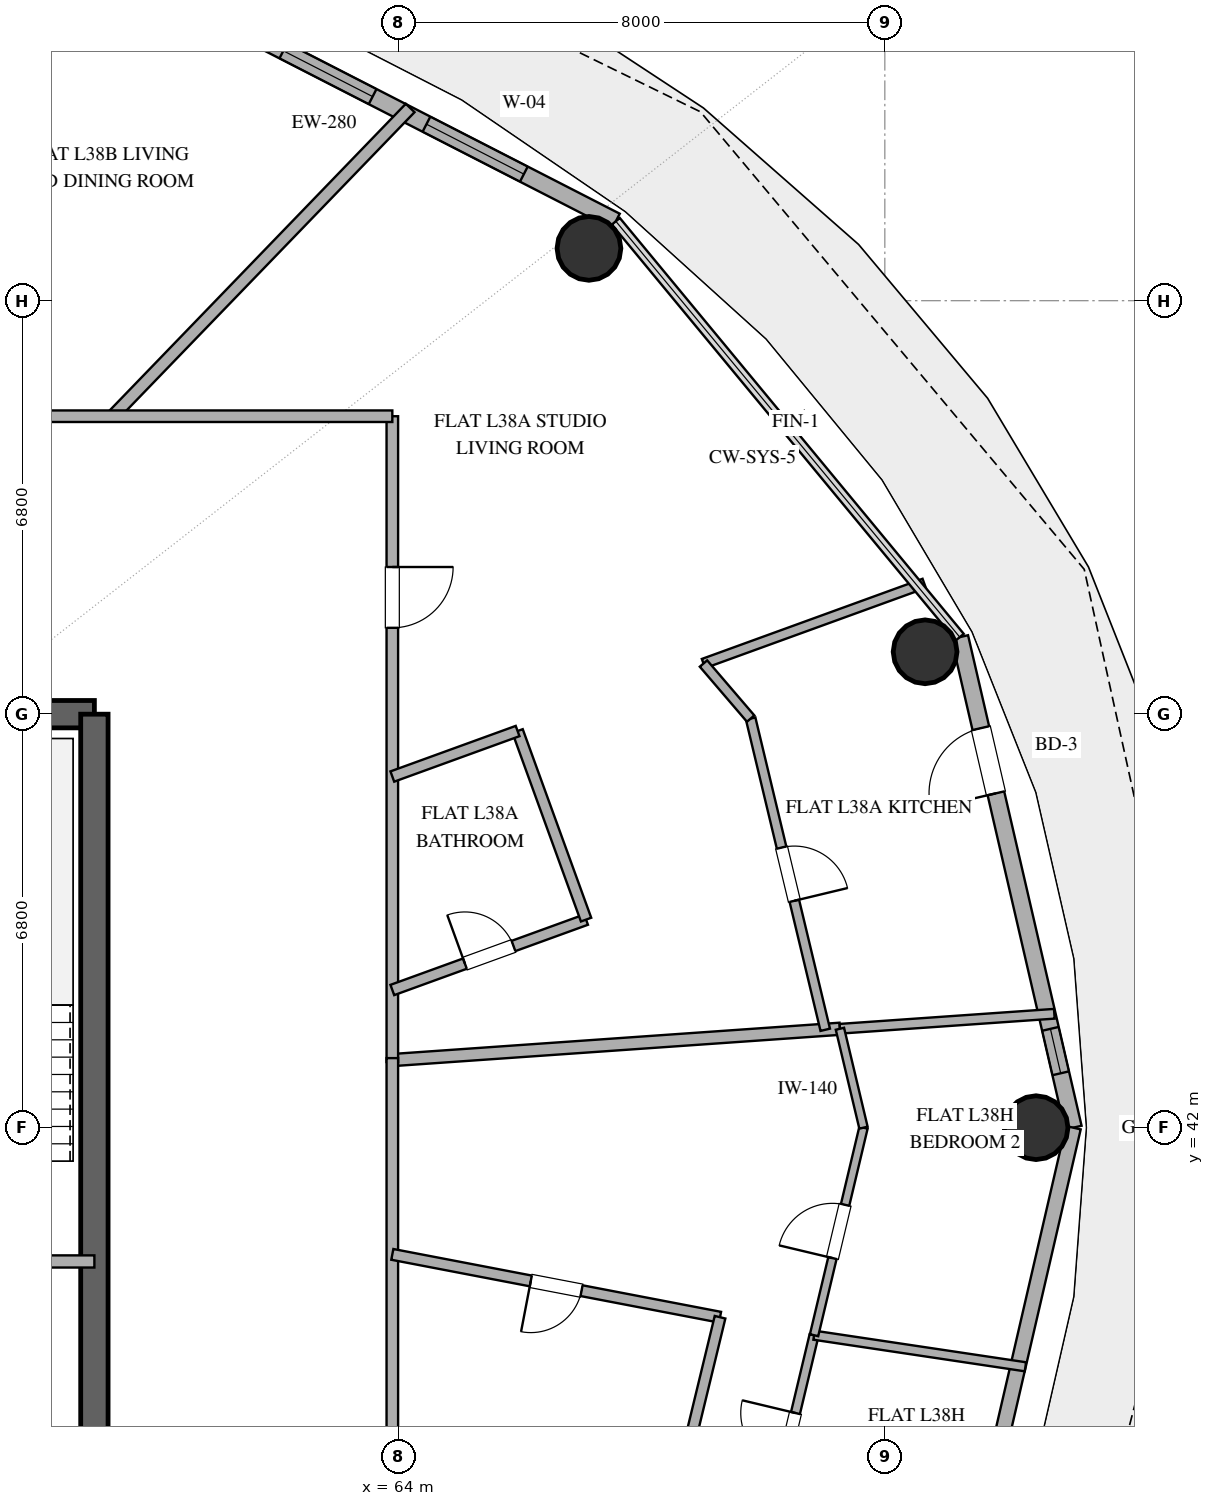
"""IFC4 building model, lengths in metres.
Left out: names, types, materials, properties, quantities, classifications, styles, units other than length and angle.
Written with IfcOpenShell. Run it as: python <this file> out.ifc"""

import sys

from ifc_helpers import new_model, si_unit, direction, frame, frame_2d, origin, origin_2d, place, context, subcontext, project, spatial, rectangle, hollow_circle, extrude, element, fill, save


model = new_model("IFC4")
c1 = context("Model", 3, precision=1e-05, world=origin(), true_north=direction((0.0, 1.0)))
c2 = subcontext(c1, "Body", "Model", "MODEL_VIEW")
j1 = project(units=[si_unit("LENGTHUNIT", "METRE"), si_unit("PLANEANGLEUNIT", "RADIAN")], contexts=[c1])
p1 = place(None, origin())
s1 = spatial("IfcSite", under=j1, at=p1, CompositionType="ELEMENT")
p2 = place(p1, origin())
s2 = spatial("IfcBuilding", under=s1, at=p2, CompositionType="ELEMENT")
p3 = place(p2, frame((0.0, 0.0, 154.2)))
s3 = spatial("IfcBuildingStorey", under=s2, at=p3, CompositionType="ELEMENT", Elevation=154.2)
p4 = place(p3, frame((55.0, 48.8, 0.0), z_axis=(0.0, 0.0, 1.0), x_axis=(1.0, 0.0, 0.0)))
e1 = element("IfcWall", 1, at=p4, inside=s3, PredefinedType="SHEAR", context=c2, shape_type="SweptSolid", body=[
    extrude(rectangle(XDim=4.0, YDim=0.45, at=frame_2d((2.0, 0.0))), origin(), (0.0, 0.0, 1.0), 3.38),
])
p5 = place(p3, frame((59.0, 35.2, 0.0), z_axis=(0.0, 0.0, 1.0), x_axis=(0.0, 1.0, 0.0)))
e2 = element("IfcWall", 2, at=p5, inside=s3, PredefinedType="SHEAR", context=c2, shape_type="SweptSolid", body=[
    extrude(rectangle(XDim=13.6, YDim=0.45, at=frame_2d((6.8, 0.0))), origin(), (0.0, 0.0, 1.0), 3.38),
])
for number, where, z_axis, x_axis in (
    (3, (74.487, 42.0, 0.0), (0.0, 0.0, 1.0), (1.0, 0.0, 0.0)),
    (4, (72.662, 49.826, 0.0), (0.0, 0.0, 1.0), (1.0, 0.0, 0.0)),
    (5, (67.134, 56.46, 0.0), (0.0, 0.0, 1.0), (1.0, 0.0, 0.0)),
):
    element("IfcColumn", number, at=place(p3, frame(where, z_axis=z_axis, x_axis=x_axis)), inside=s3, PredefinedType="COLUMN", context=c2, shape_type="SweptSolid", body=[
        extrude(hollow_circle(Radius=0.525, WallThickness=0.028, at=origin_2d()), origin(), (0.0, 0.0, 1.0), 3.38),
    ])
p6 = place(p3, frame((75.099, 42.0, 0.0), z_axis=(0.0, 0.0, 1.0), x_axis=(-0.225473184558, 0.974249374157, 0.0)))
e6 = element("IfcWall", 6, at=p6, inside=s3, PredefinedType="SOLIDWALL", context=c2, shape_type="SweptSolid", body=[
    extrude(rectangle(XDim=8.28, YDim=0.28, at=frame_2d((4.14, 0.0))), origin(), (0.0, 0.0, 1.0), 3.38),
])
p7 = place(p6, frame((5.644, 0.0, 0.0)))
e7 = element("IfcOpeningElement", 7, at=p7, cuts=e6, PredefinedType="OPENING", context=c2, shape_type="SweptSolid", body=[
    extrude(rectangle(XDim=1.1, YDim=2.25, at=frame_2d((0.55, 1.125))), frame((0.0, 0.15, 0.0), z_axis=(0.0, -1.0, 0.0), x_axis=(1.0, 0.0, 0.0)), (0.0, 0.0, 1.0), 0.3),
])
p8 = place(p6, frame((0.918, 0.0, 0.85)))
e8 = element("IfcOpeningElement", 8, at=p8, cuts=e6, PredefinedType="OPENING", context=c2, shape_type="SweptSolid", body=[
    extrude(rectangle(XDim=0.75, YDim=1.8, at=frame_2d((0.375, 0.9))), frame((0.0, 0.15, 0.0), z_axis=(0.0, -1.0, 0.0), x_axis=(1.0, 0.0, 0.0)), (0.0, 0.0, 1.0), 0.3),
])
p9 = place(p3, frame((67.576, 56.906, 0.0), z_axis=(0.0, 0.0, 1.0), x_axis=(-0.889872523182, 0.456209263919, 0.0)))
e9 = element("IfcWall", 9, at=p9, inside=s3, PredefinedType="SOLIDWALL", context=c2, shape_type="SweptSolid", body=[
    extrude(rectangle(XDim=10.016, YDim=0.28, at=frame_2d((5.008, 0.0))), origin(), (0.0, 0.0, 1.0), 3.38),
])
p10 = place(p9, frame((1.7, 0.0, 0.85)))
e10 = element("IfcOpeningElement", 10, at=p10, cuts=e9, PredefinedType="OPENING", context=c2, shape_type="SweptSolid", body=[
    extrude(rectangle(XDim=1.8, YDim=2.2, at=frame_2d((0.9, 1.1))), frame((0.0, 0.15, 0.0), z_axis=(0.0, -1.0, 0.0), x_axis=(1.0, 0.0, 0.0)), (0.0, 0.0, 1.0), 0.3),
])
p11 = place(p9, frame((4.495, 0.0, 0.85)))
e11 = element("IfcOpeningElement", 11, at=p11, cuts=e9, PredefinedType="OPENING", context=c2, shape_type="SweptSolid", body=[
    extrude(rectangle(XDim=1.65, YDim=2.0, at=frame_2d((0.825, 1.0))), frame((0.0, 0.15, 0.0), z_axis=(0.0, -1.0, 0.0), x_axis=(1.0, 0.0, 0.0)), (0.0, 0.0, 1.0), 0.3),
])
p12 = place(p9, frame((6.53, 0.0, 0.85)))
e12 = element("IfcOpeningElement", 12, at=p12, cuts=e9, PredefinedType="OPENING", context=c2, shape_type="SweptSolid", body=[
    extrude(rectangle(XDim=1.65, YDim=2.0, at=frame_2d((0.825, 1.0))), frame((0.0, 0.15, 0.0), z_axis=(0.0, -1.0, 0.0), x_axis=(1.0, 0.0, 0.0)), (0.0, 0.0, 1.0), 0.3),
])
p13 = place(p3, frame((73.232, 33.933, 0.0), z_axis=(0.0, 0.0, 1.0), x_axis=(0.225473184558, 0.974249374157, 0.0)))
e13 = element("IfcWall", 13, at=p13, inside=s3, PredefinedType="SOLIDWALL", context=c2, shape_type="SweptSolid", body=[
    extrude(rectangle(XDim=8.28, YDim=0.25, at=frame_2d((4.14, 0.0))), origin(), (0.0, 0.0, 1.0), 3.38),
])
p14 = place(p13, frame((0.886, 0.0, 1.42)))
e14 = element("IfcOpeningElement", 14, at=p14, cuts=e13, PredefinedType="OPENING", context=c2, shape_type="SweptSolid", body=[
    extrude(rectangle(XDim=1.0, YDim=1.05, at=frame_2d((0.5, 0.525))), frame((0.0, 0.135, 0.0), z_axis=(0.0, -1.0, 0.0), x_axis=(1.0, 0.0, 0.0)), (0.0, 0.0, 1.0), 0.27),
])
p15 = place(p3, frame((55.0, 39.8, 0.0), z_axis=(0.0, 0.0, 1.0), x_axis=(1.0, 0.0, 0.0)))
e15 = element("IfcWall", 15, at=p15, inside=s3, PredefinedType="SOLIDWALL", context=c2, shape_type="SweptSolid", body=[
    extrude(rectangle(XDim=4.0, YDim=0.2, at=frame_2d((2.0, 0.0))), origin(), (0.0, 0.0, 1.0), 2.74),
])
p16 = place(p15, frame((1.45, 0.0, 0.0)))
e16 = element("IfcOpeningElement", 16, at=p16, cuts=e15, PredefinedType="OPENING", context=c2, shape_type="SweptSolid", body=[
    extrude(rectangle(XDim=1.1, YDim=2.15, at=frame_2d((0.55, 1.075))), frame((0.0, 0.11, 0.0), z_axis=(0.0, -1.0, 0.0), x_axis=(1.0, 0.0, 0.0)), (0.0, 0.0, 1.0), 0.22),
])
p17 = place(p3, frame((71.261, 43.627, 0.0), z_axis=(0.0, 0.0, 1.0), x_axis=(-0.997562906323, -0.069772830877, 0.0)))
e17 = element("IfcWall", 17, at=p17, inside=s3, PredefinedType="PARTITIONING", context=c2, shape_type="SweptSolid", body=[
    extrude(rectangle(XDim=7.38, YDim=0.2, at=frame_2d((3.69, 0.0))), origin(), (0.0, 0.0, 1.0), 2.74),
])
p18 = place(p3, frame((64.194, 58.769, 0.0), z_axis=(0.0, 0.0, 1.0), x_axis=(-0.694647685064, -0.719350118952, 0.0)))
e18 = element("IfcWall", 18, at=p18, inside=s3, PredefinedType="PARTITIONING", context=c2, shape_type="SweptSolid", body=[
    extrude(rectangle(XDim=7.047, YDim=0.2, at=frame_2d((3.523, 0.0))), origin(), (0.0, 0.0, 1.0), 2.74),
])
p19 = place(p3, frame((63.9, 53.7, 0.0), z_axis=(0.0, 0.0, 1.0), x_axis=(0.0, -1.0, 0.0)))
e19 = element("IfcWall", 19, at=p19, inside=s3, PredefinedType="PARTITIONING", context=c2, shape_type="SweptSolid", body=[
    extrude(rectangle(XDim=10.62, YDim=0.19, at=frame_2d((5.31, 0.0))), origin(), (0.0, 0.0, 1.0), 2.74),
])
p20 = place(p19, frame((2.48, 0.0, 0.0)))
e20 = element("IfcOpeningElement", 20, at=p20, cuts=e19, PredefinedType="OPENING", context=c2, shape_type="SweptSolid", body=[
    extrude(rectangle(XDim=1.0, YDim=2.2, at=frame_2d((0.5, 1.1))), frame((0.0, 0.105, 0.0), z_axis=(0.0, -1.0, 0.0), x_axis=(1.0, 0.0, 0.0)), (0.0, 0.0, 1.0), 0.21),
])
p21 = place(p3, frame((49.612, 53.7, 0.0), z_axis=(0.0, 0.0, 1.0), x_axis=(1.0, 0.0, 0.0)))
e21 = element("IfcWall", 21, at=p21, inside=s3, PredefinedType="PARTITIONING", context=c2, shape_type="SweptSolid", body=[
    extrude(rectangle(XDim=14.288, YDim=0.19, at=frame_2d((7.144, 0.0))), origin(), (0.0, 0.0, 1.0), 2.74),
])
p22 = place(p21, frame((6.395, 0.0, 0.0)))
e22 = element("IfcOpeningElement", 22, at=p22, cuts=e21, PredefinedType="OPENING", context=c2, shape_type="SweptSolid", body=[
    extrude(rectangle(XDim=1.0, YDim=2.2, at=frame_2d((0.5, 1.1))), frame((0.0, 0.105, 0.0), z_axis=(0.0, -1.0, 0.0), x_axis=(1.0, 0.0, 0.0)), (0.0, 0.0, 1.0), 0.21),
])
p23 = place(p3, frame((63.9, 43.144, 0.0), z_axis=(0.0, 0.0, 1.0), x_axis=(0.0, -1.0, 0.0)))
e23 = element("IfcWall", 23, at=p23, inside=s3, PredefinedType="PARTITIONING", context=c2, shape_type="SweptSolid", body=[
    extrude(rectangle(XDim=12.844, YDim=0.19, at=frame_2d((6.422, 0.0))), origin(), (0.0, 0.0, 1.0), 2.74),
])
p24 = place(p23, frame((9.529, 0.0, 0.0)))
e24 = element("IfcOpeningElement", 24, at=p24, cuts=e23, PredefinedType="OPENING", context=c2, shape_type="SweptSolid", body=[
    extrude(rectangle(XDim=1.0, YDim=2.2, at=frame_2d((0.5, 1.1))), frame((0.0, 0.105, 0.0), z_axis=(0.0, -1.0, 0.0), x_axis=(1.0, 0.0, 0.0)), (0.0, 0.0, 1.0), 0.21),
])
p25 = place(p3, frame((69.29, 38.883, 0.0), z_axis=(0.0, 0.0, 1.0), x_axis=(-0.98210182834, 0.188350733396, 0.0)))
e25 = element("IfcWall", 25, at=p25, inside=s3, PredefinedType="PLUMBINGWALL", context=c2, shape_type="SweptSolid", body=[
    extrude(rectangle(XDim=5.488, YDim=0.18, at=frame_2d((2.744, 0.0))), origin(), (0.0, 0.0, 1.0), 2.74),
])
p26 = place(p25, frame((2.319, 0.0, 0.0)))
e26 = element("IfcOpeningElement", 26, at=p26, cuts=e25, PredefinedType="OPENING", context=c2, shape_type="SweptSolid", body=[
    extrude(rectangle(XDim=0.85, YDim=2.1, at=frame_2d((0.425, 1.05))), frame((0.0, 0.1, 0.0), z_axis=(0.0, -1.0, 0.0), x_axis=(1.0, 0.0, 0.0)), (0.0, 0.0, 1.0), 0.2),
])
p27 = place(p3, frame((69.793, 48.728, 0.0), z_axis=(0.0, 0.0, 1.0), x_axis=(0.23310450522, -0.972451690135, 0.0)))
e27 = element("IfcWall", 27, at=p27, inside=s3, PredefinedType="PLUMBINGWALL", context=c2, shape_type="SweptSolid", body=[
    extrude(rectangle(XDim=5.263, YDim=0.16, at=frame_2d((2.631, 0.0))), origin(), (0.0, 0.0, 1.0), 2.74),
])
p28 = place(p27, frame((2.181, 0.0, 0.0)))
e28 = element("IfcOpeningElement", 28, at=p28, cuts=e27, PredefinedType="OPENING", context=c2, shape_type="SweptSolid", body=[
    extrude(rectangle(XDim=0.9, YDim=2.1, at=frame_2d((0.45, 1.05))), frame((0.0, 0.09, 0.0), z_axis=(0.0, -1.0, 0.0), x_axis=(1.0, 0.0, 0.0)), (0.0, 0.0, 1.0), 0.18),
])
p29 = place(p3, frame((72.647, 50.951, 0.0), z_axis=(0.0, 0.0, 1.0), x_axis=(-0.939926248806, -0.341377572206, 0.0)))
e29 = element("IfcWall", 29, at=p29, inside=s3, PredefinedType="PLUMBINGWALL", context=c2, shape_type="SweptSolid", body=[
    extrude(rectangle(XDim=3.862, YDim=0.16, at=frame_2d((1.931, 0.0))), origin(), (0.0, 0.0, 1.0), 2.74),
])
p30 = place(p3, frame((71.261, 43.627, 0.0), z_axis=(0.0, 0.0, 1.0), x_axis=(0.997563824095, 0.069759707979, 0.0)))
e30 = element("IfcWall", 30, at=p30, inside=s3, PredefinedType="PLUMBINGWALL", context=c2, shape_type="SweptSolid", body=[
    extrude(rectangle(XDim=3.535, YDim=0.16, at=frame_2d((1.767, 0.0))), origin(), (0.0, 0.0, 1.0), 2.74),
])
p31 = place(p3, frame((70.015, 35.153, 0.0), z_axis=(0.0, 0.0, 1.0), x_axis=(0.232452361323, 0.972607783084, 0.0)))
e31 = element("IfcWall", 31, at=p31, inside=s3, PredefinedType="PARTITIONING", context=c2, shape_type="SweptSolid", body=[
    extrude(rectangle(XDim=3.531, YDim=0.15, at=frame_2d((1.766, 0.0))), origin(), (0.0, 0.0, 1.0), 2.74),
])
p32 = place(p31, frame((1.315, 0.0, 0.0)))
e32 = element("IfcOpeningElement", 32, at=p32, cuts=e31, PredefinedType="OPENING", context=c2, shape_type="SweptSolid", body=[
    extrude(rectangle(XDim=0.9, YDim=2.1, at=frame_2d((0.45, 1.05))), frame((0.0, 0.085, 0.0), z_axis=(0.0, -1.0, 0.0), x_axis=(1.0, 0.0, 0.0)), (0.0, 0.0, 1.0), 0.17),
])
p33 = place(p3, frame((74.312, 38.068, 0.0), z_axis=(0.0, 0.0, 1.0), x_axis=(-0.989013160958, 0.147827492205, 0.0)))
e33 = element("IfcWall", 33, at=p33, inside=s3, PredefinedType="PARTITIONING", context=c2, shape_type="SweptSolid", body=[
    extrude(rectangle(XDim=3.514, YDim=0.15, at=frame_2d((1.757, 0.0))), origin(), (0.0, 0.0, 1.0), 2.74),
])
p34 = place(p3, frame((70.836, 38.587, 0.0), z_axis=(0.0, 0.0, 1.0), x_axis=(0.231598574747, 0.972811441223, 0.0)))
e34 = element("IfcWall", 34, at=p34, inside=s3, PredefinedType="PARTITIONING", context=c2, shape_type="SweptSolid", body=[
    extrude(rectangle(XDim=3.508, YDim=0.14, at=frame_2d((1.754, 0.0))), origin(), (0.0, 0.0, 1.0), 2.74),
])
p35 = place(p34, frame((1.304, 0.0, 0.0)))
e35 = element("IfcOpeningElement", 35, at=p35, cuts=e34, PredefinedType="OPENING", context=c2, shape_type="SweptSolid", body=[
    extrude(rectangle(XDim=0.9, YDim=2.1, at=frame_2d((0.45, 1.05))), frame((0.0, 0.08, 0.0), z_axis=(0.0, -1.0, 0.0), x_axis=(1.0, 0.0, 0.0)), (0.0, 0.0, 1.0), 0.16),
])
p36 = place(p3, frame((63.9, 44.264, 0.0), z_axis=(0.0, 0.0, 1.0), x_axis=(0.939936319397, 0.341349843238, 0.0)))
e36 = element("IfcWall", 36, at=p36, inside=s3, PredefinedType="PLUMBINGWALL", context=c2, shape_type="SweptSolid", body=[
    extrude(rectangle(XDim=3.39, YDim=0.18, at=frame_2d((1.695, 0.0))), origin(), (0.0, 0.0, 1.0), 2.74),
])
p37 = place(p36, frame((1.27, 0.0, 0.0)))
e37 = element("IfcOpeningElement", 37, at=p37, cuts=e36, PredefinedType="OPENING", context=c2, shape_type="SweptSolid", body=[
    extrude(rectangle(XDim=0.85, YDim=2.1, at=frame_2d((0.425, 1.05))), frame((0.0, 0.1, 0.0), z_axis=(0.0, -1.0, 0.0), x_axis=(1.0, 0.0, 0.0)), (0.0, 0.0, 1.0), 0.2),
])
p38 = place(p3, frame((67.086, 45.421, 0.0), z_axis=(0.0, 0.0, 1.0), x_axis=(-0.341333094487, 0.93994240175, 0.0)))
e38 = element("IfcWall", 38, at=p38, inside=s3, PredefinedType="PLUMBINGWALL", context=c2, shape_type="SweptSolid", body=[
    extrude(rectangle(XDim=3.3, YDim=0.18, at=frame_2d((1.65, 0.0))), origin(), (0.0, 0.0, 1.0), 2.74),
])
p39 = place(p3, frame((68.526, 35.732, 0.0), z_axis=(0.0, 0.0, 1.0), x_axis=(0.235531062042, 0.971866821541, 0.0)))
e39 = element("IfcWall", 39, at=p39, inside=s3, PredefinedType="PLUMBINGWALL", context=c2, shape_type="SweptSolid", body=[
    extrude(rectangle(XDim=3.242, YDim=0.18, at=frame_2d((1.621, 0.0))), origin(), (0.0, 0.0, 1.0), 2.74),
])
p40 = place(p3, frame((65.96, 48.523, 0.0), z_axis=(0.0, 0.0, 1.0), x_axis=(-0.939962415694, -0.341277976263, 0.0)))
e40 = element("IfcWall", 40, at=p40, inside=s3, PredefinedType="PLUMBINGWALL", context=c2, shape_type="SweptSolid", body=[
    extrude(rectangle(XDim=2.192, YDim=0.18, at=frame_2d((1.096, 0.0))), origin(), (0.0, 0.0, 1.0), 2.74),
])
p41 = place(p3, frame((71.649, 42.0, 0.0), z_axis=(0.0, 0.0, 1.0), x_axis=(-0.231561310927, 0.972820311919, 0.0)))
e41 = element("IfcWall", 41, at=p41, inside=s3, PredefinedType="PARTITIONING", context=c2, shape_type="SweptSolid", body=[
    extrude(rectangle(XDim=1.672, YDim=0.14, at=frame_2d((0.836, 0.0))), origin(), (0.0, 0.0, 1.0), 2.74),
])
p42 = place(p3, frame((69.018, 49.633, 0.0), z_axis=(0.0, 0.0, 1.0), x_axis=(0.650538392346, -0.759473370227, 0.0)))
e42 = element("IfcWall", 42, at=p42, inside=s3, PredefinedType="PLUMBINGWALL", context=c2, shape_type="SweptSolid", body=[
    extrude(rectangle(XDim=1.192, YDim=0.16, at=frame_2d((0.596, 0.0))), origin(), (0.0, 0.0, 1.0), 2.74),
])
p43 = place(p7, origin())
e43 = element("IfcDoor", 43, at=p43, inside=s3, OperationType="SINGLE_SWING_LEFT", PredefinedType="DOOR", context=c2, shape_type="SweptSolid", body=[
    extrude(rectangle(XDim=1.1, YDim=2.25, at=frame_2d((0.55, 1.125))), frame((0.0, 0.025, 0.0), z_axis=(0.0, -1.0, 0.0), x_axis=(1.0, 0.0, 0.0)), (0.0, 0.0, 1.0), 0.05),
])
fill(e7, e43)
p44 = place(p10, origin())
e44 = element("IfcWindow", 44, at=p44, inside=s3, PartitioningType="SINGLE_PANEL", PredefinedType="WINDOW", context=c2, shape_type="SweptSolid", body=[
    extrude(rectangle(XDim=1.8, YDim=2.2, at=frame_2d((0.9, 1.1))), frame((0.0, 0.03, 0.0), z_axis=(0.0, -1.0, 0.0), x_axis=(1.0, 0.0, 0.0)), (0.0, 0.0, 1.0), 0.06),
])
fill(e10, e44)
p45 = place(p11, origin())
e45 = element("IfcWindow", 45, at=p45, inside=s3, PartitioningType="SINGLE_PANEL", PredefinedType="WINDOW", context=c2, shape_type="SweptSolid", body=[
    extrude(rectangle(XDim=1.65, YDim=2.0, at=frame_2d((0.825, 1.0))), frame((0.0, 0.03, 0.0), z_axis=(0.0, -1.0, 0.0), x_axis=(1.0, 0.0, 0.0)), (0.0, 0.0, 1.0), 0.06),
])
fill(e11, e45)
p46 = place(p8, origin())
e46 = element("IfcWindow", 46, at=p46, inside=s3, PartitioningType="SINGLE_PANEL", PredefinedType="WINDOW", context=c2, shape_type="SweptSolid", body=[
    extrude(rectangle(XDim=0.75, YDim=1.8, at=frame_2d((0.375, 0.9))), frame((0.0, 0.03, 0.0), z_axis=(0.0, -1.0, 0.0), x_axis=(1.0, 0.0, 0.0)), (0.0, 0.0, 1.0), 0.06),
])
fill(e8, e46)
p47 = place(p20, origin())
e47 = element("IfcDoor", 47, at=p47, inside=s3, OperationType="SINGLE_SWING_LEFT", PredefinedType="DOOR", context=c2, shape_type="SweptSolid", body=[
    extrude(rectangle(XDim=1.0, YDim=2.2, at=frame_2d((0.5, 1.1))), frame((0.0, 0.025, 0.0), z_axis=(0.0, -1.0, 0.0), x_axis=(1.0, 0.0, 0.0)), (0.0, 0.0, 1.0), 0.05),
])
fill(e20, e47)
p48 = place(p26, origin())
e48 = element("IfcDoor", 48, at=p48, inside=s3, OperationType="SINGLE_SWING_RIGHT", PredefinedType="DOOR", context=c2, shape_type="SweptSolid", body=[
    extrude(rectangle(XDim=0.85, YDim=2.1, at=frame_2d((0.425, 1.05))), frame((0.0, 0.025, 0.0), z_axis=(0.0, -1.0, 0.0), x_axis=(1.0, 0.0, 0.0)), (0.0, 0.0, 1.0), 0.05),
])
fill(e26, e48)
p49 = place(p28, origin())
e49 = element("IfcDoor", 49, at=p49, inside=s3, OperationType="SINGLE_SWING_RIGHT", PredefinedType="DOOR", context=c2, shape_type="SweptSolid", body=[
    extrude(rectangle(XDim=0.9, YDim=2.1, at=frame_2d((0.45, 1.05))), frame((0.0, 0.025, 0.0), z_axis=(0.0, -1.0, 0.0), x_axis=(1.0, 0.0, 0.0)), (0.0, 0.0, 1.0), 0.05),
])
fill(e28, e49)
p50 = place(p32, origin())
e50 = element("IfcDoor", 50, at=p50, inside=s3, OperationType="SINGLE_SWING_RIGHT", PredefinedType="DOOR", context=c2, shape_type="SweptSolid", body=[
    extrude(rectangle(XDim=0.9, YDim=2.1, at=frame_2d((0.45, 1.05))), frame((0.0, 0.025, 0.0), z_axis=(0.0, -1.0, 0.0), x_axis=(1.0, 0.0, 0.0)), (0.0, 0.0, 1.0), 0.05),
])
fill(e32, e50)
p51 = place(p35, origin())
e51 = element("IfcDoor", 51, at=p51, inside=s3, OperationType="SINGLE_SWING_LEFT", PredefinedType="DOOR", context=c2, shape_type="SweptSolid", body=[
    extrude(rectangle(XDim=0.9, YDim=2.1, at=frame_2d((0.45, 1.05))), frame((0.0, 0.025, 0.0), z_axis=(0.0, -1.0, 0.0), x_axis=(1.0, 0.0, 0.0)), (0.0, 0.0, 1.0), 0.05),
])
fill(e35, e51)
p52 = place(p37, origin())
e52 = element("IfcDoor", 52, at=p52, inside=s3, OperationType="SINGLE_SWING_LEFT", PredefinedType="DOOR", context=c2, shape_type="SweptSolid", body=[
    extrude(rectangle(XDim=0.85, YDim=2.1, at=frame_2d((0.425, 1.05))), frame((0.0, 0.025, 0.0), z_axis=(0.0, -1.0, 0.0), x_axis=(1.0, 0.0, 0.0)), (0.0, 0.0, 1.0), 0.05),
])
fill(e37, e52)
save(model, sys.argv[1])
